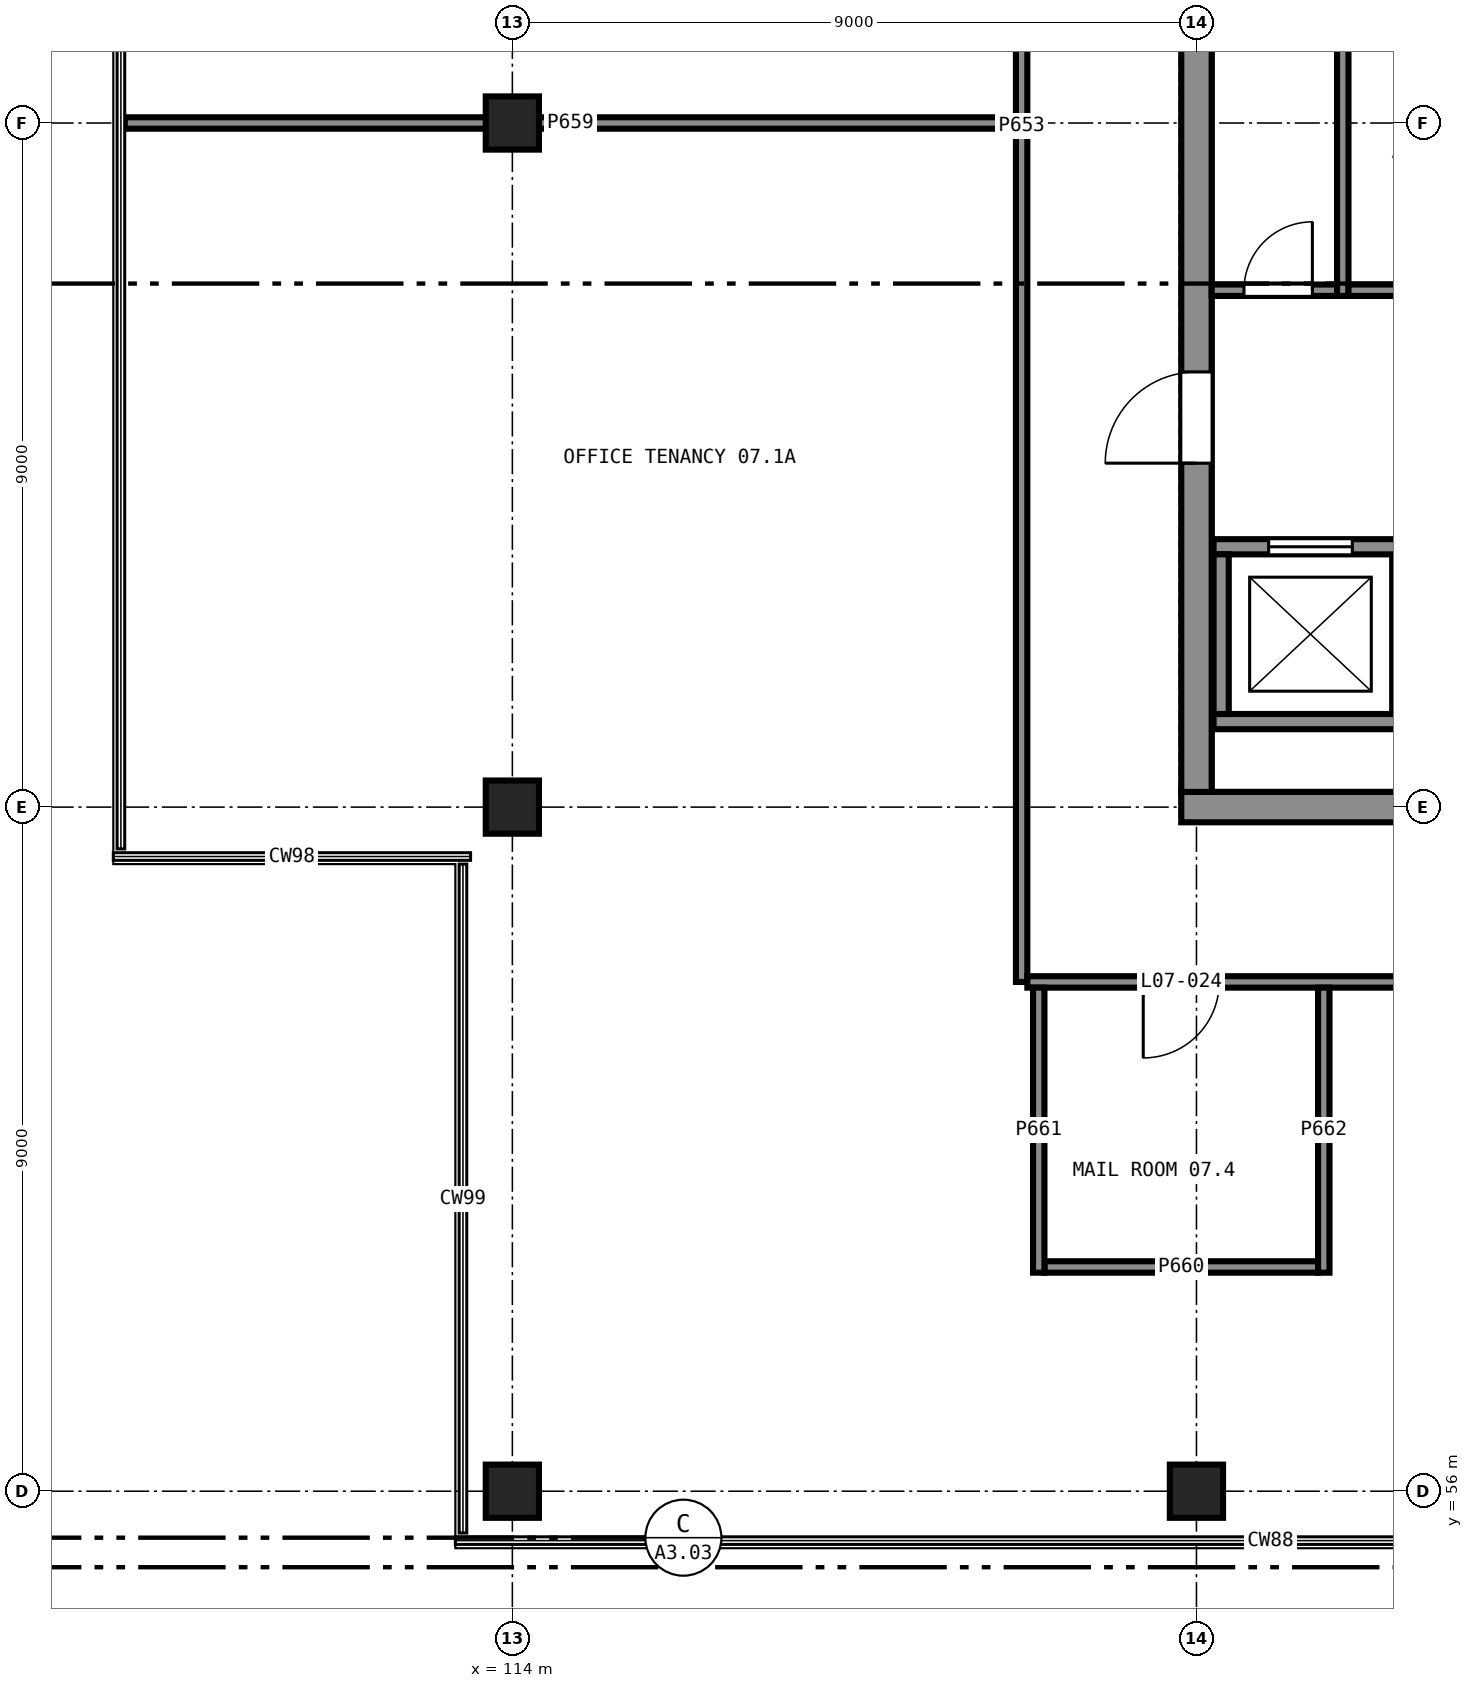
"""IFC4 building model, lengths in metres.
Left out: names, types, materials, properties, quantities, classifications, styles, units other than length and angle.
Written with IfcOpenShell. Run it as: python <this file> out.ifc"""

import sys

from ifc_helpers import new_model, si_unit, direction, frame, frame_2d, origin, origin_2d, place, context, subcontext, project, spatial, rectangle, extrude, element, fill, save


model = new_model("IFC4")
c1 = context("Model", 3, precision=1e-05, world=origin(), true_north=direction((0.0, 1.0)))
c2 = subcontext(c1, "Body", "Model", "MODEL_VIEW")
j1 = project(units=[si_unit("LENGTHUNIT", "METRE"), si_unit("PLANEANGLEUNIT", "RADIAN")], contexts=[c1])
p1 = place(None, origin())
s1 = spatial("IfcSite", under=j1, at=p1, CompositionType="ELEMENT")
p2 = place(p1, origin())
s2 = spatial("IfcBuilding", under=s1, at=p2, CompositionType="ELEMENT")
p3 = place(p2, frame((0.0, 0.0, 29.5)))
s3 = spatial("IfcBuildingStorey", under=s2, at=p3, CompositionType="ELEMENT", Elevation=29.5)
for number, where, z_axis, x_axis in (
    (1, (114.0, 56.0, 0.0), (0.0, 0.0, 1.0), (1.0, 0.0, 0.0)),
    (2, (114.0, 65.0, 0.0), (0.0, 0.0, 1.0), (1.0, 0.0, 0.0)),
    (3, (114.0, 74.0, 0.0), (0.0, 0.0, 1.0), (1.0, 0.0, 0.0)),
    (4, (123.0, 56.0, 0.0), (0.0, 0.0, 1.0), (1.0, 0.0, 0.0)),
):
    element("IfcColumn", number, at=place(p3, frame(where, z_axis=z_axis, x_axis=x_axis)), inside=s3, PredefinedType="COLUMN", context=c2, shape_type="SweptSolid", body=[
        extrude(rectangle(XDim=0.7, YDim=0.7, at=origin_2d()), origin(), (0.0, 0.0, 1.0), 4.0),
    ])
p4 = place(p3, frame((122.8, 65.0, 0.0), z_axis=(0.0, 0.0, 1.0), x_axis=(1.0, 0.0, 0.0)))
e5 = element("IfcWall", 5, at=p4, inside=s3, PredefinedType="SHEAR", context=c2, shape_type="SweptSolid", body=[
    extrude(rectangle(XDim=18.4, YDim=0.4, at=frame_2d((9.2, 0.0))), origin(), (0.0, 0.0, 1.0), 4.0),
])
p5 = place(p3, frame((123.0, 82.8, 0.0), z_axis=(0.0, 0.0, 1.0), x_axis=(0.0, -1.0, 0.0)))
e6 = element("IfcWall", 6, at=p5, inside=s3, PredefinedType="SHEAR", context=c2, shape_type="SweptSolid", body=[
    extrude(rectangle(XDim=17.6, YDim=0.4, at=frame_2d((8.8, 0.0))), origin(), (0.0, 0.0, 1.0), 4.0),
])
p6 = place(p5, frame((12.075, 0.0, 0.0)))
e7 = element("IfcOpeningElement", 7, at=p6, cuts=e6, PredefinedType="OPENING", context=c2, shape_type="SweptSolid", body=[
    extrude(rectangle(XDim=1.2, YDim=2.1, at=frame_2d((0.6, 1.05))), frame((0.0, 0.21, 0.0), z_axis=(0.0, -1.0, 0.0), x_axis=(1.0, 0.0, 0.0)), (0.0, 0.0, 1.0), 0.42),
])
p7 = place(p5, frame((4.325, 0.0, 0.0)))
e8 = element("IfcOpeningElement", 8, at=p7, cuts=e6, PredefinedType="OPENING", context=c2, shape_type="SweptSolid", body=[
    extrude(rectangle(XDim=1.2, YDim=2.1, at=frame_2d((0.6, 1.05))), frame((0.0, 0.21, 0.0), z_axis=(0.0, -1.0, 0.0), x_axis=(1.0, 0.0, 0.0)), (0.0, 0.0, 1.0), 0.42),
])
p8 = place(p3, frame((123.225, 66.125, 0.0), z_axis=(0.0, 0.0, 1.0), x_axis=(1.0, 0.0, 0.0)))
e9 = element("IfcWall", 9, at=p8, inside=s3, PredefinedType="SHEAR", context=c2, shape_type="SweptSolid", body=[
    extrude(rectangle(XDim=2.55, YDim=0.2, at=frame_2d((1.275, 0.0))), origin(), (0.0, 0.0, 1.0), 4.0),
])
p9 = place(p3, frame((125.675, 66.225, 0.0), z_axis=(0.0, 0.0, 1.0), x_axis=(0.0, 1.0, 0.0)))
e10 = element("IfcWall", 10, at=p9, inside=s3, PredefinedType="SHEAR", context=c2, shape_type="SweptSolid", body=[
    extrude(rectangle(XDim=2.1, YDim=0.2, at=frame_2d((1.05, 0.0))), origin(), (0.0, 0.0, 1.0), 4.0),
])
p10 = place(p3, frame((125.775, 68.425, 0.0), z_axis=(0.0, 0.0, 1.0), x_axis=(-1.0, 0.0, 0.0)))
e11 = element("IfcWall", 11, at=p10, inside=s3, PredefinedType="SHEAR", context=c2, shape_type="SweptSolid", body=[
    extrude(rectangle(XDim=2.55, YDim=0.2, at=frame_2d((1.275, 0.0))), origin(), (0.0, 0.0, 1.0), 4.0),
])
p11 = place(p10, frame((0.725, 0.0, 0.0)))
e12 = element("IfcOpeningElement", 12, at=p11, cuts=e11, PredefinedType="OPENING", context=c2, shape_type="SweptSolid", body=[
    extrude(rectangle(XDim=1.1, YDim=2.1, at=frame_2d((0.55, 1.05))), frame((0.0, 0.11, 0.0), z_axis=(0.0, -1.0, 0.0), x_axis=(1.0, 0.0, 0.0)), (0.0, 0.0, 1.0), 0.22),
])
p12 = place(p3, frame((123.325, 68.325, 0.0), z_axis=(0.0, 0.0, 1.0), x_axis=(0.0, -1.0, 0.0)))
e13 = element("IfcWall", 13, at=p12, inside=s3, PredefinedType="SHEAR", context=c2, shape_type="SweptSolid", body=[
    extrude(rectangle(XDim=2.1, YDim=0.2, at=frame_2d((1.05, 0.0))), origin(), (0.0, 0.0, 1.0), 4.0),
])
p13 = place(p3, frame((124.925, 71.725, 0.0), z_axis=(0.0, 0.0, 1.0), x_axis=(0.0, 1.0, 0.0)))
e14 = element("IfcWall", 14, at=p13, inside=s3, PredefinedType="PARTITIONING", context=c2, shape_type="SweptSolid", body=[
    extrude(rectangle(XDim=4.55, YDim=0.15, at=frame_2d((2.275, 0.0))), origin(), (0.0, 0.0, 1.0), 3.75),
])
p14 = place(p3, frame((123.2, 71.8, 0.0), z_axis=(0.0, 0.0, 1.0), x_axis=(1.0, 0.0, 0.0)))
e15 = element("IfcWall", 15, at=p14, inside=s3, PredefinedType="PARTITIONING", context=c2, shape_type="SweptSolid", body=[
    extrude(rectangle(XDim=1.65, YDim=0.15, at=frame_2d((0.825, 0.0))), origin(), (0.0, 0.0, 1.0), 3.75),
])
p15 = place(p14, frame((0.425, 0.0, 0.0)))
e16 = element("IfcOpeningElement", 16, at=p15, cuts=e15, PredefinedType="OPENING", context=c2, shape_type="SweptSolid", body=[
    extrude(rectangle(XDim=0.9, YDim=2.1, at=frame_2d((0.45, 1.05))), frame((0.0, 0.085, 0.0), z_axis=(0.0, -1.0, 0.0), x_axis=(1.0, 0.0, 0.0)), (0.0, 0.0, 1.0), 0.17),
])
p16 = place(p3, frame((125.0, 71.8, 0.0), z_axis=(0.0, 0.0, 1.0), x_axis=(1.0, 0.0, 0.0)))
e17 = element("IfcWall", 17, at=p16, inside=s3, PredefinedType="PARTITIONING", context=c2, shape_type="SweptSolid", body=[
    extrude(rectangle(XDim=3.05, YDim=0.15, at=frame_2d((1.525, 0.0))), origin(), (0.0, 0.0, 1.0), 3.75),
])
p17 = place(p3, frame((120.7, 62.7, 0.0), z_axis=(0.0, 0.0, 1.0), x_axis=(0.0, 1.0, 0.0)))
e18 = element("IfcWall", 18, at=p17, inside=s3, PredefinedType="PARTITIONING", context=c2, shape_type="SweptSolid", body=[
    extrude(rectangle(XDim=22.525, YDim=0.15, at=frame_2d((11.263, 0.0))), origin(), (0.0, 0.0, 1.0), 3.75),
])
p18 = place(p17, frame((16.435, 0.0, 0.0)))
e19 = element("IfcOpeningElement", 19, at=p18, cuts=e18, PredefinedType="OPENING", context=c2, shape_type="SweptSolid", body=[
    extrude(rectangle(XDim=1.0, YDim=2.1, at=frame_2d((0.5, 1.05))), frame((0.0, 0.085, 0.0), z_axis=(0.0, -1.0, 0.0), x_axis=(1.0, 0.0, 0.0)), (0.0, 0.0, 1.0), 0.17),
])
p19 = place(p3, frame((132.6, 62.7, 0.0), z_axis=(0.0, 0.0, 1.0), x_axis=(-1.0, 0.0, 0.0)))
e20 = element("IfcWall", 20, at=p19, inside=s3, PredefinedType="PARTITIONING", context=c2, shape_type="SweptSolid", body=[
    extrude(rectangle(XDim=11.825, YDim=0.15, at=frame_2d((5.913, 0.0))), origin(), (0.0, 0.0, 1.0), 3.75),
])
p20 = place(p19, frame((9.3, 0.0, 0.0)))
e21 = element("IfcOpeningElement", 21, at=p20, cuts=e20, PredefinedType="OPENING", context=c2, shape_type="SweptSolid", body=[
    extrude(rectangle(XDim=1.0, YDim=2.1, at=frame_2d((0.5, 1.05))), frame((0.0, 0.085, 0.0), z_axis=(0.0, -1.0, 0.0), x_axis=(1.0, 0.0, 0.0)), (0.0, 0.0, 1.0), 0.17),
])
p21 = place(p19, frame((5.427, 0.0, 0.0)))
e22 = element("IfcOpeningElement", 22, at=p21, cuts=e20, PredefinedType="OPENING", context=c2, shape_type="SweptSolid", body=[
    extrude(rectangle(XDim=1.0, YDim=2.1, at=frame_2d((0.5, 1.05))), frame((0.0, 0.085, 0.0), z_axis=(0.0, -1.0, 0.0), x_axis=(1.0, 0.0, 0.0)), (0.0, 0.0, 1.0), 0.17),
])
p22 = place(p3, frame((108.9, 74.0, 0.0), z_axis=(0.0, 0.0, 1.0), x_axis=(1.0, 0.0, 0.0)))
e23 = element("IfcWall", 23, at=p22, inside=s3, PredefinedType="PARTITIONING", context=c2, shape_type="SweptSolid", body=[
    extrude(rectangle(XDim=11.726, YDim=0.15, at=frame_2d((5.863, 0.0))), origin(), (0.0, 0.0, 1.0), 2.85),
])
p23 = place(p3, frame((121.0, 58.95, 0.0), z_axis=(0.0, 0.0, 1.0), x_axis=(1.0, 0.0, 0.0)))
e24 = element("IfcWall", 24, at=p23, inside=s3, PredefinedType="PARTITIONING", context=c2, shape_type="SweptSolid", body=[
    extrude(rectangle(XDim=3.6, YDim=0.15, at=frame_2d((1.8, 0.0))), origin(), (0.0, 0.0, 1.0), 3.75),
])
for number, where, z_axis, x_axis in (
    (25, (120.925, 62.625, 0.0), (0.0, 0.0, 1.0), (0.0, -1.0, 0.0)),
    (26, (124.675, 62.625, 0.0), (0.0, 0.0, 1.0), (0.0, -1.0, 0.0)),
):
    element("IfcWall", number, at=place(p3, frame(where, z_axis=z_axis, x_axis=x_axis)), inside=s3, PredefinedType="PARTITIONING", context=c2, shape_type="SweptSolid", body=[
        extrude(rectangle(XDim=3.75, YDim=0.15, at=frame_2d((1.875, 0.0))), origin(), (0.0, 0.0, 1.0), 3.75),
    ])
p24 = place(p11, origin())
e27 = element("IfcDoor", 27, at=p24, inside=s3, OperationType="SLIDING_TO_LEFT", PredefinedType="DOOR", context=c2, shape_type="SweptSolid", body=[
    extrude(rectangle(XDim=1.1, YDim=2.1, at=frame_2d((0.55, 1.05))), frame((0.0, 0.025, 0.0), z_axis=(0.0, -1.0, 0.0), x_axis=(1.0, 0.0, 0.0)), (0.0, 0.0, 1.0), 0.05),
])
fill(e12, e27)
p25 = place(p6, frame((1.2, 0.0, 0.0), z_axis=(0.0, 0.0, 1.0), x_axis=(-1.0, 0.0, 0.0)))
e28 = element("IfcDoor", 28, at=p25, inside=s3, OperationType="SINGLE_SWING_RIGHT", PredefinedType="DOOR", context=c2, shape_type="SweptSolid", body=[
    extrude(rectangle(XDim=1.2, YDim=2.1, at=frame_2d((0.6, 1.05))), frame((0.0, 0.025, 0.0), z_axis=(0.0, -1.0, 0.0), x_axis=(1.0, 0.0, 0.0)), (0.0, 0.0, 1.0), 0.05),
])
fill(e7, e28)
p26 = place(p15, origin())
e29 = element("IfcDoor", 29, at=p26, inside=s3, OperationType="SINGLE_SWING_LEFT", PredefinedType="DOOR", context=c2, shape_type="SweptSolid", body=[
    extrude(rectangle(XDim=0.9, YDim=2.1, at=frame_2d((0.45, 1.05))), frame((0.0, 0.025, 0.0), z_axis=(0.0, -1.0, 0.0), x_axis=(1.0, 0.0, 0.0)), (0.0, 0.0, 1.0), 0.05),
])
fill(e16, e29)
p27 = place(p20, origin())
e30 = element("IfcDoor", 30, at=p27, inside=s3, OperationType="SINGLE_SWING_LEFT", PredefinedType="DOOR", context=c2, shape_type="SweptSolid", body=[
    extrude(rectangle(XDim=1.0, YDim=2.1, at=frame_2d((0.5, 1.05))), frame((0.0, 0.025, 0.0), z_axis=(0.0, -1.0, 0.0), x_axis=(1.0, 0.0, 0.0)), (0.0, 0.0, 1.0), 0.05),
])
fill(e21, e30)
save(model, sys.argv[1])
